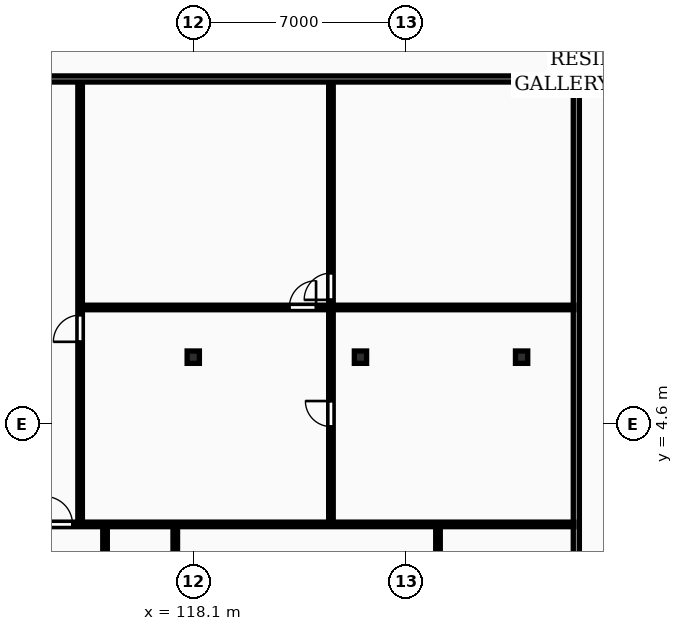
"""IFC4 building model, lengths in metres.
Left out: names, types, materials, properties, quantities, classifications, styles, units other than length and angle.
Written with IfcOpenShell. Run it as: python <this file> out.ifc"""

import sys

from ifc_helpers import new_model, si_unit, direction, frame, frame_2d, origin, origin_2d, place, context, subcontext, project, spatial, rectangle, i_section, extrude, element, fill, save


model = new_model("IFC4")
c1 = context("Model", 3, precision=1e-05, world=origin(), true_north=direction((0.0, 1.0)))
c2 = subcontext(c1, "Body", "Model", "MODEL_VIEW")
j1 = project(units=[si_unit("LENGTHUNIT", "METRE"), si_unit("PLANEANGLEUNIT", "RADIAN")], contexts=[c1])
p1 = place(None, origin())
s1 = spatial("IfcSite", under=j1, at=p1, CompositionType="ELEMENT")
p2 = place(p1, origin())
s2 = spatial("IfcBuilding", under=s1, at=p2, CompositionType="ELEMENT")
p3 = place(p2, frame((0.0, 0.0, 139.3)))
s3 = spatial("IfcBuildingStorey", under=s2, at=p3, CompositionType="ELEMENT", Elevation=139.3)
for number, where, z_axis, x_axis in (
    (1, (118.1, 6.8, 0.0), (0.0, 0.0, 1.0), (1.0, 0.0, 0.0)),
    (2, (123.6, 6.8, 0.0), (0.0, 0.0, 1.0), (1.0, 0.0, 0.0)),
    (3, (128.9, 6.8, 0.0), (0.0, 0.0, 1.0), (1.0, 0.0, 0.0)),
):
    element("IfcColumn", number, at=place(p3, frame(where, z_axis=z_axis, x_axis=x_axis)), inside=s3, PredefinedType="COLUMN", context=c2, shape_type="SweptSolid", body=[
        extrude(i_section(OverallWidth=0.403, OverallDepth=0.406, WebThickness=0.027, FlangeThickness=0.043, FilletRadius=0.015, at=origin_2d()), origin(), (0.0, 0.0, 1.0), 3.6),
    ])
p4 = place(p3, frame((130.7, -8.7, 0.0), z_axis=(0.0, 0.0, 1.0), x_axis=(0.0, 1.0, 0.0)))
e4 = element("IfcWall", 4, at=p4, inside=s3, PredefinedType="PARTITIONING", context=c2, shape_type="SweptSolid", body=[
    extrude(rectangle(XDim=24.57, YDim=0.2, at=frame_2d((12.285, 0.0))), origin(), (0.0, 0.0, 1.0), 3.31),
])
p5 = place(p3, frame((122.629, 1.34, 0.0), z_axis=(0.0, 0.0, 1.0), x_axis=(0.0, 1.0, 0.0)))
e5 = element("IfcWall", 5, at=p5, inside=s3, PredefinedType="PARTITIONING", context=c2, shape_type="SweptSolid", body=[
    extrude(rectangle(XDim=14.55, YDim=0.15, at=frame_2d((7.275, 0.0))), origin(), (0.0, 0.0, 1.0), 3.31),
])
p6 = place(p5, frame((3.177, 0.0, 0.0)))
e6 = element("IfcOpeningElement", 6, at=p6, cuts=e5, PredefinedType="OPENING", context=c2, shape_type="SweptSolid", body=[
    extrude(rectangle(XDim=0.84, YDim=2.04, at=frame_2d((0.42, 1.02))), frame((0.0, 0.085, 0.0), z_axis=(0.0, -1.0, 0.0), x_axis=(1.0, 0.0, 0.0)), (0.0, 0.0, 1.0), 0.17),
])
p7 = place(p5, frame((7.345, 0.0, 0.0)))
e7 = element("IfcOpeningElement", 7, at=p7, cuts=e5, PredefinedType="OPENING", context=c2, shape_type="SweptSolid", body=[
    extrude(rectangle(XDim=0.88, YDim=2.06, at=frame_2d((0.44, 1.03))), frame((0.0, 0.085, 0.0), z_axis=(0.0, -1.0, 0.0), x_axis=(1.0, 0.0, 0.0)), (0.0, 0.0, 1.0), 0.17),
])
p8 = place(p3, frame((114.438, 8.435, 0.0), z_axis=(0.0, 0.0, 1.0), x_axis=(1.0, 0.0, 0.0)))
e8 = element("IfcWall", 8, at=p8, inside=s3, PredefinedType="PARTITIONING", context=c2, shape_type="SweptSolid", body=[
    extrude(rectangle(XDim=16.182, YDim=0.15, at=frame_2d((8.091, 0.0))), origin(), (0.0, 0.0, 1.0), 3.31),
])
p9 = place(p8, frame((6.821, 0.0, 0.0)))
e9 = element("IfcOpeningElement", 9, at=p9, cuts=e8, PredefinedType="OPENING", context=c2, shape_type="SweptSolid", body=[
    extrude(rectangle(XDim=0.88, YDim=2.06, at=frame_2d((0.44, 1.03))), frame((0.0, 0.085, 0.0), z_axis=(0.0, -1.0, 0.0), x_axis=(1.0, 0.0, 0.0)), (0.0, 0.0, 1.0), 0.17),
])
p10 = place(p3, frame((114.378, 1.34, 0.0), z_axis=(0.0, 0.0, 1.0), x_axis=(0.0, 1.0, 0.0)))
e10 = element("IfcWall", 10, at=p10, inside=s3, PredefinedType="PARTITIONING", context=c2, shape_type="SweptSolid", body=[
    extrude(rectangle(XDim=14.55, YDim=0.15, at=frame_2d((7.275, 0.0))), origin(), (0.0, 0.0, 1.0), 3.31),
])
p11 = place(p10, frame((5.965, 0.0, 0.0)))
e11 = element("IfcOpeningElement", 11, at=p11, cuts=e10, PredefinedType="OPENING", context=c2, shape_type="SweptSolid", body=[
    extrude(rectangle(XDim=0.88, YDim=2.06, at=frame_2d((0.44, 1.03))), frame((0.0, 0.085, 0.0), z_axis=(0.0, -1.0, 0.0), x_axis=(1.0, 0.0, 0.0)), (0.0, 0.0, 1.0), 0.17),
])
p12 = place(p3, frame((117.508, -1.43, 0.0), z_axis=(0.0, 0.0, 1.0), x_axis=(0.0, 1.0, 0.0)))
e12 = element("IfcWall", 12, at=p12, inside=s3, PredefinedType="PARTITIONING", context=c2, shape_type="SweptSolid", body=[
    extrude(rectangle(XDim=2.69, YDim=0.15, at=frame_2d((1.345, 0.0))), origin(), (0.0, 0.0, 1.0), 3.31),
])
p13 = place(p3, frame((115.198, -8.7, 0.0), z_axis=(0.0, 0.0, 1.0), x_axis=(0.0, 1.0, 0.0)))
e13 = element("IfcWall", 13, at=p13, inside=s3, PredefinedType="PARTITIONING", context=c2, shape_type="SweptSolid", body=[
    extrude(rectangle(XDim=9.96, YDim=0.15, at=frame_2d((4.98, 0.0))), origin(), (0.0, 0.0, 1.0), 3.31),
])
p14 = place(p13, frame((5.22, 0.0, 0.0)))
e14 = element("IfcOpeningElement", 14, at=p14, cuts=e13, PredefinedType="OPENING", context=c2, shape_type="SweptSolid", body=[
    extrude(rectangle(XDim=0.92, YDim=2.08, at=frame_2d((0.46, 1.04))), frame((0.0, 0.085, 0.0), z_axis=(0.0, -1.0, 0.0), x_axis=(1.0, 0.0, 0.0)), (0.0, 0.0, 1.0), 0.17),
])
p15 = place(p3, frame((126.15, -1.43, 0.0), z_axis=(0.0, 0.0, 1.0), x_axis=(0.0, 1.0, 0.0)))
e15 = element("IfcWall", 15, at=p15, inside=s3, PredefinedType="PARTITIONING", context=c2, shape_type="SweptSolid", body=[
    extrude(rectangle(XDim=2.69, YDim=0.15, at=frame_2d((1.345, 0.0))), origin(), (0.0, 0.0, 1.0), 3.31),
])
p16 = place(p3, frame((110.488, 1.3, 0.0), z_axis=(0.0, 0.0, 1.0), x_axis=(1.0, 0.0, 0.0)))
e16 = element("IfcWall", 16, at=p16, inside=s3, PredefinedType="PARTITIONING", context=c2, shape_type="SweptSolid", body=[
    extrude(rectangle(XDim=20.132, YDim=0.15, at=frame_2d((10.066, 0.0))), origin(), (0.0, 0.0, 1.0), 3.31),
])
p17 = place(p16, frame((2.72, 0.0, 0.0)))
e17 = element("IfcOpeningElement", 17, at=p17, cuts=e16, PredefinedType="OPENING", context=c2, shape_type="SweptSolid", body=[
    extrude(rectangle(XDim=0.92, YDim=2.08, at=frame_2d((0.46, 1.04))), frame((0.0, 0.085, 0.0), z_axis=(0.0, -1.0, 0.0), x_axis=(1.0, 0.0, 0.0)), (0.0, 0.0, 1.0), 0.17),
])
p18 = place(p3, frame((72.7, 15.95, 0.0), z_axis=(0.0, 0.0, 1.0), x_axis=(1.0, 0.0, 0.0)))
e18 = element("IfcWall", 18, at=p18, inside=s3, PredefinedType="PARTITIONING", context=c2, shape_type="SweptSolid", body=[
    extrude(rectangle(XDim=58.0, YDim=0.2, at=frame_2d((29.0, 0.0))), origin(), (0.0, 0.0, 1.0), 3.31),
])
p19 = place(p18, frame((2.045, 0.0, 0.0)))
e19 = element("IfcOpeningElement", 19, at=p19, cuts=e18, PredefinedType="OPENING", context=c2, shape_type="SweptSolid", body=[
    extrude(rectangle(XDim=0.95, YDim=2.15, at=frame_2d((0.475, 1.075))), frame((0.0, 0.11, 0.0), z_axis=(0.0, -1.0, 0.0), x_axis=(1.0, 0.0, 0.0)), (0.0, 0.0, 1.0), 0.22),
])
p20 = place(p18, frame((24.295, 0.0, 0.0)))
e20 = element("IfcOpeningElement", 20, at=p20, cuts=e18, PredefinedType="OPENING", context=c2, shape_type="SweptSolid", body=[
    extrude(rectangle(XDim=0.95, YDim=2.15, at=frame_2d((0.475, 1.075))), frame((0.0, 0.11, 0.0), z_axis=(0.0, -1.0, 0.0), x_axis=(1.0, 0.0, 0.0)), (0.0, 0.0, 1.0), 0.22),
])
p21 = place(p18, frame((39.753, 0.0, 0.0)))
e21 = element("IfcOpeningElement", 21, at=p21, cuts=e18, PredefinedType="OPENING", context=c2, shape_type="SweptSolid", body=[
    extrude(rectangle(XDim=0.95, YDim=2.15, at=frame_2d((0.475, 1.075))), frame((0.0, 0.11, 0.0), z_axis=(0.0, -1.0, 0.0), x_axis=(1.0, 0.0, 0.0)), (0.0, 0.0, 1.0), 0.22),
])
p22 = place(p6, origin())
e22 = element("IfcDoor", 22, at=p22, inside=s3, OperationType="SINGLE_SWING_RIGHT", PredefinedType="DOOR", context=c2, shape_type="SweptSolid", body=[
    extrude(rectangle(XDim=0.84, YDim=2.04, at=frame_2d((0.42, 1.02))), frame((0.0, 0.025, 0.0), z_axis=(0.0, -1.0, 0.0), x_axis=(1.0, 0.0, 0.0)), (0.0, 0.0, 1.0), 0.05),
])
fill(e6, e22)
p23 = place(p7, origin())
e23 = element("IfcDoor", 23, at=p23, inside=s3, OperationType="SINGLE_SWING_LEFT", PredefinedType="DOOR", context=c2, shape_type="SweptSolid", body=[
    extrude(rectangle(XDim=0.88, YDim=2.06, at=frame_2d((0.44, 1.03))), frame((0.0, 0.025, 0.0), z_axis=(0.0, -1.0, 0.0), x_axis=(1.0, 0.0, 0.0)), (0.0, 0.0, 1.0), 0.05),
])
fill(e7, e23)
p24 = place(p9, origin())
e24 = element("IfcDoor", 24, at=p24, inside=s3, OperationType="SINGLE_SWING_RIGHT", PredefinedType="DOOR", context=c2, shape_type="SweptSolid", body=[
    extrude(rectangle(XDim=0.88, YDim=2.06, at=frame_2d((0.44, 1.03))), frame((0.0, 0.025, 0.0), z_axis=(0.0, -1.0, 0.0), x_axis=(1.0, 0.0, 0.0)), (0.0, 0.0, 1.0), 0.05),
])
fill(e9, e24)
p25 = place(p11, origin())
e25 = element("IfcDoor", 25, at=p25, inside=s3, OperationType="SINGLE_SWING_LEFT", PredefinedType="DOOR", context=c2, shape_type="SweptSolid", body=[
    extrude(rectangle(XDim=0.88, YDim=2.06, at=frame_2d((0.44, 1.03))), frame((0.0, 0.025, 0.0), z_axis=(0.0, -1.0, 0.0), x_axis=(1.0, 0.0, 0.0)), (0.0, 0.0, 1.0), 0.05),
])
fill(e11, e25)
p26 = place(p17, origin())
e26 = element("IfcDoor", 26, at=p26, inside=s3, OperationType="SINGLE_SWING_LEFT", PredefinedType="DOOR", context=c2, shape_type="SweptSolid", body=[
    extrude(rectangle(XDim=0.92, YDim=2.08, at=frame_2d((0.46, 1.04))), frame((0.0, 0.025, 0.0), z_axis=(0.0, -1.0, 0.0), x_axis=(1.0, 0.0, 0.0)), (0.0, 0.0, 1.0), 0.05),
])
fill(e17, e26)
save(model, sys.argv[1])
